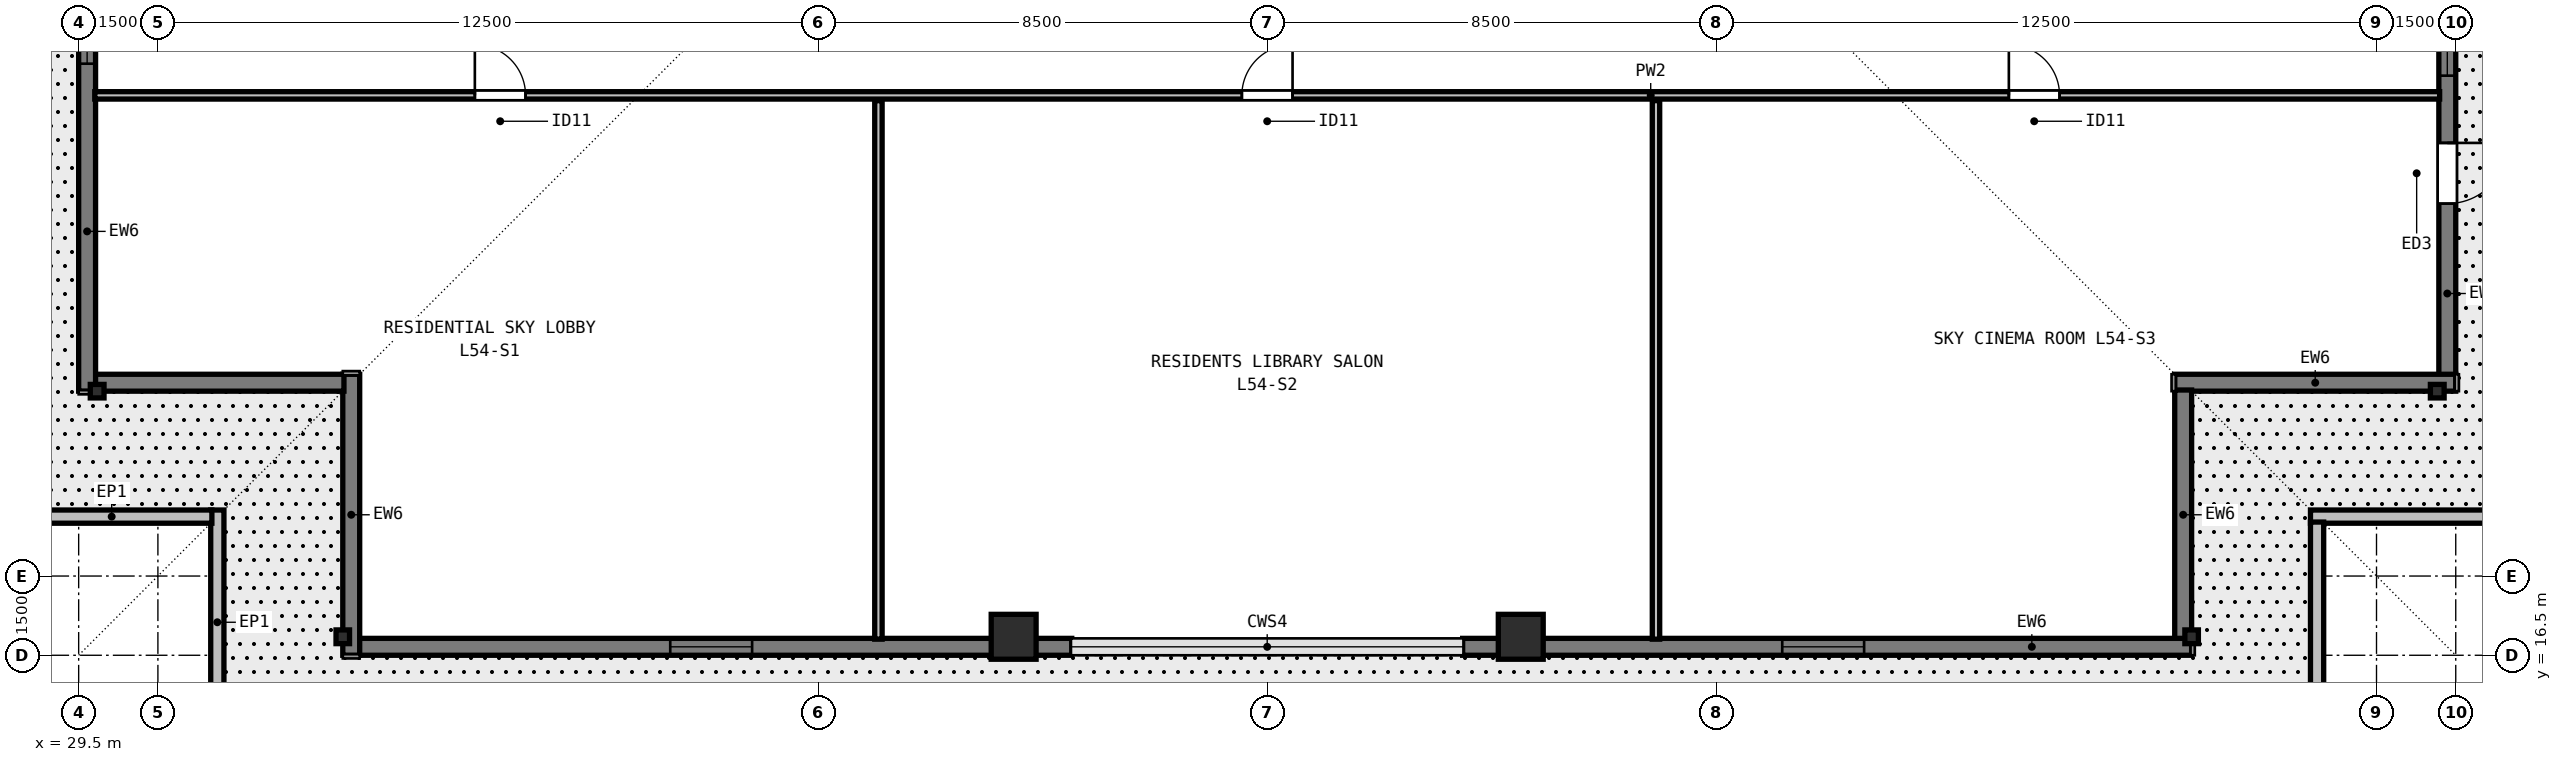
"""IFC4 building model, lengths in metres.
Left out: names, types, materials, properties, quantities, classifications, styles, units other than length and angle.
Written with IfcOpenShell. Run it as: python <this file> out.ifc"""

import sys

from ifc_helpers import new_model, si_unit, direction, frame, frame_2d, origin, origin_2d, place, context, subcontext, project, spatial, rectangle, i_section, extrude, element, fill, save


model = new_model("IFC4")
c1 = context("Model", 3, precision=1e-05, world=origin(), true_north=direction((0.0, 1.0)))
c2 = subcontext(c1, "Body", "Model", "MODEL_VIEW")
j1 = project(units=[si_unit("LENGTHUNIT", "METRE"), si_unit("PLANEANGLEUNIT", "RADIAN")], contexts=[c1])
p1 = place(None, origin())
s1 = spatial("IfcSite", under=j1, at=p1, CompositionType="ELEMENT")
p2 = place(p1, origin())
s2 = spatial("IfcBuilding", under=s1, at=p2, CompositionType="ELEMENT")
p3 = place(p2, frame((0.0, 0.0, 198.0)))
s3 = spatial("IfcBuildingStorey", under=s2, at=p3, CompositionType="ELEMENT", Elevation=198.0)
p4 = place(p3, frame((34.5, 16.85, 0.0), z_axis=(0.0, 0.0, 1.0), x_axis=(1.0, 0.0, 0.0)))
e1 = element("IfcColumn", 1, at=p4, inside=s3, PredefinedType="COLUMN", context=c2, shape_type="SweptSolid", body=[
    extrude(i_section(OverallWidth=0.256, OverallDepth=0.26, WebThickness=0.01, FlangeThickness=0.017, FilletRadius=0.013, at=origin_2d()), origin(), (0.0, 0.0, 1.0), 4.5),
])
for number, where, z_axis, x_axis in (
    (2, (47.2, 16.85, 0.0), (0.0, 0.0, 1.0), (1.0, 0.0, 0.0)),
    (3, (56.8, 16.85, 0.0), (0.0, 0.0, 1.0), (1.0, 0.0, 0.0)),
):
    element("IfcColumn", number, at=place(p3, frame(where, z_axis=z_axis, x_axis=x_axis)), inside=s3, PredefinedType="COLUMN", context=c2, shape_type="SweptSolid", body=[
        extrude(rectangle(XDim=0.85, YDim=0.85, at=origin_2d()), origin(), (0.0, 0.0, 1.0), 4.5),
    ])
for number, where, z_axis, x_axis in (
    (4, (69.5, 16.85, 0.0), (0.0, 0.0, 1.0), (1.0, 0.0, 0.0)),
    (5, (74.15, 21.5, 0.0), (0.0, 0.0, 1.0), (0.0, 1.0, 0.0)),
    (6, (29.85, 21.5, 0.0), (0.0, 0.0, 1.0), (0.0, 1.0, 0.0)),
):
    element("IfcColumn", number, at=place(p3, frame(where, z_axis=z_axis, x_axis=x_axis)), inside=s3, PredefinedType="COLUMN", context=c2, shape_type="SweptSolid", body=[
        extrude(i_section(OverallWidth=0.256, OverallDepth=0.26, WebThickness=0.01, FlangeThickness=0.017, FilletRadius=0.013, at=origin_2d()), origin(), (0.0, 0.0, 1.0), 4.5),
    ])
p5 = place(p3, frame((32.125, 15.0, 0.0), z_axis=(0.0, 0.0, 1.0), x_axis=(0.0, 1.0, 0.0)))
e7 = element("IfcWall", 7, at=p5, inside=s3, PredefinedType="PARAPET", context=c2, shape_type="SweptSolid", body=[
    extrude(rectangle(XDim=4.25, YDim=0.25, at=frame_2d((2.125, 0.0))), origin(), (0.0, 0.0, 1.0), 1.15),
])
p6 = place(p3, frame((32.022, 19.125, 0.0), z_axis=(0.0, 0.0, 1.0), x_axis=(-1.0, 0.0, 0.0)))
e8 = element("IfcWall", 8, at=p6, inside=s3, PredefinedType="PARAPET", context=c2, shape_type="SweptSolid", body=[
    extrude(rectangle(XDim=3.794, YDim=0.25, at=frame_2d((1.897, 0.0))), origin(), (0.0, 0.0, 1.0), 1.15),
])
p7 = place(p3, frame((76.0, 19.125, 0.0), z_axis=(0.0, 0.0, 1.0), x_axis=(-1.0, 0.0, 0.0)))
e9 = element("IfcWall", 9, at=p7, inside=s3, PredefinedType="PARAPET", context=c2, shape_type="SweptSolid", body=[
    extrude(rectangle(XDim=4.25, YDim=0.25, at=frame_2d((2.125, 0.0))), origin(), (0.0, 0.0, 1.0), 1.15),
])
p8 = place(p3, frame((71.875, 19.022, 0.0), z_axis=(0.0, 0.0, 1.0), x_axis=(0.0, -1.0, 0.0)))
e10 = element("IfcWall", 10, at=p8, inside=s3, PredefinedType="PARAPET", context=c2, shape_type="SweptSolid", body=[
    extrude(rectangle(XDim=3.794, YDim=0.25, at=frame_2d((1.897, 0.0))), origin(), (0.0, 0.0, 1.0), 1.15),
])
p9 = place(p3, frame((74.34, 44.4, 0.0), z_axis=(0.0, 0.0, 1.0), x_axis=(0.0, -1.0, 0.0)))
e11 = element("IfcWall", 11, at=p9, inside=s3, PredefinedType="SOLIDWALL", context=c2, shape_type="SweptSolid", body=[
    extrude(rectangle(XDim=22.602, YDim=0.32, at=frame_2d((11.301, 0.0))), origin(), (0.0, 0.0, 1.0), 4.29),
])
p10 = place(p9, frame((2.225, 0.0, 0.8)))
e12 = element("IfcOpeningElement", 12, at=p10, cuts=e11, PredefinedType="OPENING", context=c2, shape_type="SweptSolid", body=[
    extrude(rectangle(XDim=1.55, YDim=1.8, at=frame_2d((0.775, 0.9))), frame((0.0, 0.17, 0.0), z_axis=(0.0, -1.0, 0.0), x_axis=(1.0, 0.0, 0.0)), (0.0, 0.0, 1.0), 0.34),
])
p11 = place(p9, frame((5.576, 0.0, 0.8)))
e13 = element("IfcOpeningElement", 13, at=p11, cuts=e11, PredefinedType="OPENING", context=c2, shape_type="SweptSolid", body=[
    extrude(rectangle(XDim=1.85, YDim=1.85, at=frame_2d((0.925, 0.925))), frame((0.0, 0.17, 0.0), z_axis=(0.0, -1.0, 0.0), x_axis=(1.0, 0.0, 0.0)), (0.0, 0.0, 1.0), 0.34),
])
p12 = place(p9, frame((7.976, 0.0, 0.8)))
e14 = element("IfcOpeningElement", 14, at=p12, cuts=e11, PredefinedType="OPENING", context=c2, shape_type="SweptSolid", body=[
    extrude(rectangle(XDim=1.55, YDim=1.8, at=frame_2d((0.775, 0.9))), frame((0.0, 0.17, 0.0), z_axis=(0.0, -1.0, 0.0), x_axis=(1.0, 0.0, 0.0)), (0.0, 0.0, 1.0), 0.34),
])
p13 = place(p9, frame((11.726, 0.0, 0.8)))
e15 = element("IfcOpeningElement", 15, at=p13, cuts=e11, PredefinedType="OPENING", context=c2, shape_type="SweptSolid", body=[
    extrude(rectangle(XDim=1.85, YDim=1.85, at=frame_2d((0.925, 0.925))), frame((0.0, 0.17, 0.0), z_axis=(0.0, -1.0, 0.0), x_axis=(1.0, 0.0, 0.0)), (0.0, 0.0, 1.0), 0.34),
])
p14 = place(p9, frame((15.377, 0.0, 0.8)))
e16 = element("IfcOpeningElement", 16, at=p14, cuts=e11, PredefinedType="OPENING", context=c2, shape_type="SweptSolid", body=[
    extrude(rectangle(XDim=1.55, YDim=1.8, at=frame_2d((0.775, 0.9))), frame((0.0, 0.17, 0.0), z_axis=(0.0, -1.0, 0.0), x_axis=(1.0, 0.0, 0.0)), (0.0, 0.0, 1.0), 0.34),
])
p15 = place(p9, frame((18.2, 0.0, 0.0)))
e17 = element("IfcOpeningElement", 17, at=p15, cuts=e11, PredefinedType="OPENING", context=c2, shape_type="SweptSolid", body=[
    extrude(rectangle(XDim=1.15, YDim=2.15, at=frame_2d((0.575, 1.075))), frame((0.0, 0.17, 0.0), z_axis=(0.0, -1.0, 0.0), x_axis=(1.0, 0.0, 0.0)), (0.0, 0.0, 1.0), 0.34),
])
p16 = place(p3, frame((74.5, 21.66, 0.0), z_axis=(0.0, 0.0, 1.0), x_axis=(-1.0, 0.0, 0.0)))
e18 = element("IfcWall", 18, at=p16, inside=s3, PredefinedType="SOLIDWALL", context=c2, shape_type="SweptSolid", body=[
    extrude(rectangle(XDim=5.32, YDim=0.32, at=frame_2d((2.66, 0.0))), origin(), (0.0, 0.0, 1.0), 4.29),
])
p17 = place(p3, frame((69.34, 21.522, 0.0), z_axis=(0.0, 0.0, 1.0), x_axis=(0.0, -1.0, 0.0)))
e19 = element("IfcWall", 19, at=p17, inside=s3, PredefinedType="SOLIDWALL", context=c2, shape_type="SweptSolid", body=[
    extrude(rectangle(XDim=4.724, YDim=0.32, at=frame_2d((2.362, 0.0))), origin(), (0.0, 0.0, 1.0), 4.29),
])
p18 = place(p3, frame((69.5, 16.66, 0.0), z_axis=(0.0, 0.0, 1.0), x_axis=(-1.0, 0.0, 0.0)))
e20 = element("IfcWall", 20, at=p18, inside=s3, PredefinedType="SOLIDWALL", context=c2, shape_type="SweptSolid", body=[
    extrude(rectangle(XDim=13.8, YDim=0.32, at=frame_2d((6.9, 0.0))), origin(), (0.0, 0.0, 1.0), 4.29),
])
p19 = place(p18, frame((6.2, 0.0, 0.8)))
e21 = element("IfcOpeningElement", 21, at=p19, cuts=e20, PredefinedType="OPENING", context=c2, shape_type="SweptSolid", body=[
    extrude(rectangle(XDim=1.55, YDim=1.8, at=frame_2d((0.775, 0.9))), frame((0.0, 0.17, 0.0), z_axis=(0.0, -1.0, 0.0), x_axis=(1.0, 0.0, 0.0)), (0.0, 0.0, 1.0), 0.34),
])
p20 = place(p3, frame((48.3, 16.66, 0.0), z_axis=(0.0, 0.0, 1.0), x_axis=(-1.0, 0.0, 0.0)))
e22 = element("IfcWall", 22, at=p20, inside=s3, PredefinedType="SOLIDWALL", context=c2, shape_type="SweptSolid", body=[
    extrude(rectangle(XDim=13.502, YDim=0.32, at=frame_2d((6.751, 0.0))), origin(), (0.0, 0.0, 1.0), 4.29),
])
p21 = place(p20, frame((6.051, 0.0, 0.8)))
e23 = element("IfcOpeningElement", 23, at=p21, cuts=e22, PredefinedType="OPENING", context=c2, shape_type="SweptSolid", body=[
    extrude(rectangle(XDim=1.55, YDim=1.8, at=frame_2d((0.775, 0.9))), frame((0.0, 0.17, 0.0), z_axis=(0.0, -1.0, 0.0), x_axis=(1.0, 0.0, 0.0)), (0.0, 0.0, 1.0), 0.34),
])
p22 = place(p3, frame((34.66, 16.5, 0.0), z_axis=(0.0, 0.0, 1.0), x_axis=(0.0, 1.0, 0.0)))
e24 = element("IfcWall", 24, at=p22, inside=s3, PredefinedType="SOLIDWALL", context=c2, shape_type="SweptSolid", body=[
    extrude(rectangle(XDim=5.32, YDim=0.32, at=frame_2d((2.66, 0.0))), origin(), (0.0, 0.0, 1.0), 4.29),
])
p23 = place(p3, frame((34.522, 21.66, 0.0), z_axis=(0.0, 0.0, 1.0), x_axis=(-1.0, 0.0, 0.0)))
e25 = element("IfcWall", 25, at=p23, inside=s3, PredefinedType="SOLIDWALL", context=c2, shape_type="SweptSolid", body=[
    extrude(rectangle(XDim=4.724, YDim=0.32, at=frame_2d((2.362, 0.0))), origin(), (0.0, 0.0, 1.0), 4.29),
])
p24 = place(p3, frame((29.66, 21.5, 0.0), z_axis=(0.0, 0.0, 1.0), x_axis=(0.0, 1.0, 0.0)))
e26 = element("IfcWall", 26, at=p24, inside=s3, PredefinedType="SOLIDWALL", context=c2, shape_type="SweptSolid", body=[
    extrude(rectangle(XDim=13.8, YDim=0.32, at=frame_2d((6.9, 0.0))), origin(), (0.0, 0.0, 1.0), 4.29),
])
p25 = place(p24, frame((6.2, 0.0, 0.8)))
e27 = element("IfcOpeningElement", 27, at=p25, cuts=e26, PredefinedType="OPENING", context=c2, shape_type="SweptSolid", body=[
    extrude(rectangle(XDim=1.55, YDim=1.8, at=frame_2d((0.775, 0.9))), frame((0.0, 0.17, 0.0), z_axis=(0.0, -1.0, 0.0), x_axis=(1.0, 0.0, 0.0)), (0.0, 0.0, 1.0), 0.34),
])
p26 = place(p3, frame((29.805, 27.1, 0.0), z_axis=(0.0, 0.0, 1.0), x_axis=(1.0, 0.0, 0.0)))
e28 = element("IfcWall", 28, at=p26, inside=s3, PredefinedType="PARTITIONING", context=c2, shape_type="SweptSolid", body=[
    extrude(rectangle(XDim=44.39, YDim=0.14, at=frame_2d((22.195, 0.0))), origin(), (0.0, 0.0, 1.0), 3.958),
])
p27 = place(p26, frame((7.195, 0.0, 0.0)))
e29 = element("IfcOpeningElement", 29, at=p27, cuts=e28, PredefinedType="OPENING", context=c2, shape_type="SweptSolid", body=[
    extrude(rectangle(XDim=0.96, YDim=2.12, at=frame_2d((0.48, 1.06))), frame((0.0, 0.08, 0.0), z_axis=(0.0, -1.0, 0.0), x_axis=(1.0, 0.0, 0.0)), (0.0, 0.0, 1.0), 0.16),
])
p28 = place(p26, frame((21.715, 0.0, 0.0)))
e30 = element("IfcOpeningElement", 30, at=p28, cuts=e28, PredefinedType="OPENING", context=c2, shape_type="SweptSolid", body=[
    extrude(rectangle(XDim=0.96, YDim=2.12, at=frame_2d((0.48, 1.06))), frame((0.0, 0.08, 0.0), z_axis=(0.0, -1.0, 0.0), x_axis=(1.0, 0.0, 0.0)), (0.0, 0.0, 1.0), 0.16),
])
p29 = place(p26, frame((36.235, 0.0, 0.0)))
e31 = element("IfcOpeningElement", 31, at=p29, cuts=e28, PredefinedType="OPENING", context=c2, shape_type="SweptSolid", body=[
    extrude(rectangle(XDim=0.96, YDim=2.12, at=frame_2d((0.48, 1.06))), frame((0.0, 0.08, 0.0), z_axis=(0.0, -1.0, 0.0), x_axis=(1.0, 0.0, 0.0)), (0.0, 0.0, 1.0), 0.16),
])
for number, where, z_axis, x_axis in (
    (32, (44.64, 16.805, 0.0), (0.0, 0.0, 1.0), (0.0, 1.0, 0.0)),
    (33, (59.36, 16.805, 0.0), (0.0, 0.0, 1.0), (0.0, 1.0, 0.0)),
):
    element("IfcWall", number, at=place(p3, frame(where, z_axis=z_axis, x_axis=x_axis)), inside=s3, PredefinedType="PARTITIONING", context=c2, shape_type="SweptSolid", body=[
        extrude(rectangle(XDim=10.195, YDim=0.14, at=frame_2d((5.098, 0.0))), origin(), (0.0, 0.0, 1.0), 4.29),
    ])
p30 = place(p14, origin())
e34 = element("IfcWindow", 34, at=p30, inside=s3, PartitioningType="SINGLE_PANEL", PredefinedType="WINDOW", context=c2, shape_type="SweptSolid", body=[
    extrude(rectangle(XDim=1.55, YDim=1.8, at=frame_2d((0.775, 0.9))), frame((0.0, -0.05, 0.0), z_axis=(0.0, -1.0, 0.0), x_axis=(1.0, 0.0, 0.0)), (0.0, 0.0, 1.0), 0.06),
])
fill(e16, e34)
p31 = place(p19, origin())
e35 = element("IfcWindow", 35, at=p31, inside=s3, PartitioningType="SINGLE_PANEL", PredefinedType="WINDOW", context=c2, shape_type="SweptSolid", body=[
    extrude(rectangle(XDim=1.55, YDim=1.8, at=frame_2d((0.775, 0.9))), frame((0.0, -0.04, 0.0), z_axis=(0.0, -1.0, 0.0), x_axis=(1.0, 0.0, 0.0)), (0.0, 0.0, 1.0), 0.06),
])
fill(e21, e35)
p32 = place(p21, origin())
e36 = element("IfcWindow", 36, at=p32, inside=s3, PartitioningType="SINGLE_PANEL", PredefinedType="WINDOW", context=c2, shape_type="SweptSolid", body=[
    extrude(rectangle(XDim=1.55, YDim=1.8, at=frame_2d((0.775, 0.9))), frame((0.0, -0.04, 0.0), z_axis=(0.0, -1.0, 0.0), x_axis=(1.0, 0.0, 0.0)), (0.0, 0.0, 1.0), 0.06),
])
fill(e23, e36)
p33 = place(p25, origin())
e37 = element("IfcWindow", 37, at=p33, inside=s3, PartitioningType="SINGLE_PANEL", PredefinedType="WINDOW", context=c2, shape_type="SweptSolid", body=[
    extrude(rectangle(XDim=1.55, YDim=1.8, at=frame_2d((0.775, 0.9))), frame((0.0, -0.04, 0.0), z_axis=(0.0, -1.0, 0.0), x_axis=(1.0, 0.0, 0.0)), (0.0, 0.0, 1.0), 0.06),
])
fill(e27, e37)
p34 = place(p15, origin())
e38 = element("IfcDoor", 38, at=p34, inside=s3, OperationType="SINGLE_SWING_LEFT", PredefinedType="DOOR", context=c2, shape_type="SweptSolid", body=[
    extrude(rectangle(XDim=1.15, YDim=2.15, at=frame_2d((0.575, 1.075))), frame((0.0, 0.025, 0.0), z_axis=(0.0, -1.0, 0.0), x_axis=(1.0, 0.0, 0.0)), (0.0, 0.0, 1.0), 0.05),
])
fill(e17, e38)
p35 = place(p27, origin())
e39 = element("IfcDoor", 39, at=p35, inside=s3, OperationType="SINGLE_SWING_LEFT", PredefinedType="DOOR", context=c2, shape_type="SweptSolid", body=[
    extrude(rectangle(XDim=0.96, YDim=2.12, at=frame_2d((0.48, 1.06))), frame((0.0, 0.025, 0.0), z_axis=(0.0, -1.0, 0.0), x_axis=(1.0, 0.0, 0.0)), (0.0, 0.0, 1.0), 0.05),
])
fill(e29, e39)
p36 = place(p28, origin())
e40 = element("IfcDoor", 40, at=p36, inside=s3, OperationType="SINGLE_SWING_RIGHT", PredefinedType="DOOR", context=c2, shape_type="SweptSolid", body=[
    extrude(rectangle(XDim=0.96, YDim=2.12, at=frame_2d((0.48, 1.06))), frame((0.0, 0.025, 0.0), z_axis=(0.0, -1.0, 0.0), x_axis=(1.0, 0.0, 0.0)), (0.0, 0.0, 1.0), 0.05),
])
fill(e30, e40)
p37 = place(p29, origin())
e41 = element("IfcDoor", 41, at=p37, inside=s3, OperationType="SINGLE_SWING_LEFT", PredefinedType="DOOR", context=c2, shape_type="SweptSolid", body=[
    extrude(rectangle(XDim=0.96, YDim=2.12, at=frame_2d((0.48, 1.06))), frame((0.0, 0.025, 0.0), z_axis=(0.0, -1.0, 0.0), x_axis=(1.0, 0.0, 0.0)), (0.0, 0.0, 1.0), 0.05),
])
fill(e31, e41)
save(model, sys.argv[1])
